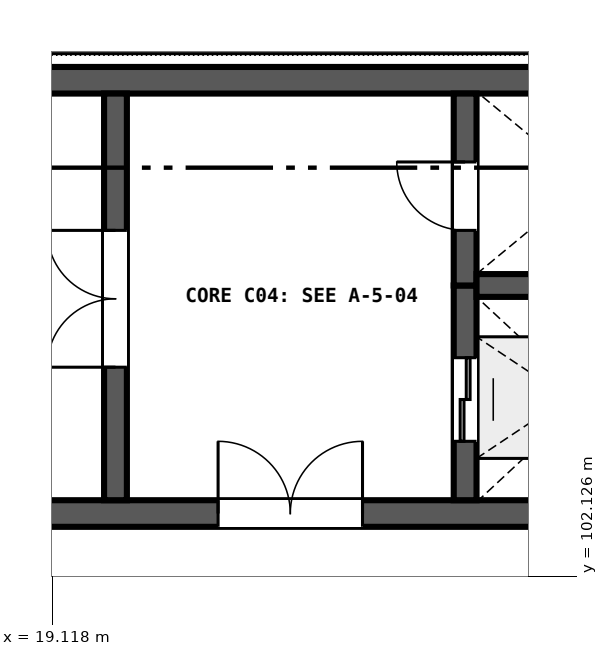
"""IFC4 building model, lengths in metres.
Left out: names, types, materials, properties, quantities, classifications, styles, units other than length and angle.
Written with IfcOpenShell. Run it as: python <this file> out.ifc"""

import sys

from ifc_helpers import new_model, si_unit, direction, frame, frame_2d, origin, place, context, subcontext, project, spatial, rectangle, extrude, element, fill, save


model = new_model("IFC4")
c1 = context("Model", 3, precision=1e-05, world=origin(), true_north=direction((0.0, 1.0)))
c2 = subcontext(c1, "Body", "Model", "MODEL_VIEW")
j1 = project(units=[si_unit("LENGTHUNIT", "METRE"), si_unit("PLANEANGLEUNIT", "RADIAN")], contexts=[c1])
p1 = place(None, origin())
s1 = spatial("IfcSite", under=j1, at=p1, CompositionType="ELEMENT")
p2 = place(p1, origin())
s2 = spatial("IfcBuilding", under=s1, at=p2, CompositionType="ELEMENT")
p3 = place(p2, frame((0.0, 0.0, 4.8)))
s3 = spatial("IfcBuildingStorey", under=s2, at=p3, CompositionType="ELEMENT", Elevation=4.8)
p4 = place(p3, frame((9.9, 102.95, 0.0), z_axis=(0.0, 0.0, 1.0), x_axis=(1.0, 0.0, 0.0)))
e1 = element("IfcWall", 1, at=p4, inside=s3, PredefinedType="SHEAR", context=c2, shape_type="SweptSolid", body=[
    extrude(rectangle(XDim=18.0, YDim=0.35, at=frame_2d((9.0, 0.0))), origin(), (0.0, 0.0, 1.0), 4.52),
])
p5 = place(p4, frame((11.4, 0.0, 0.0)))
e2 = element("IfcOpeningElement", 2, at=p5, cuts=e1, PredefinedType="OPENING", context=c2, shape_type="SweptSolid", body=[
    extrude(rectangle(XDim=1.9, YDim=2.25, at=frame_2d((0.95, 1.125))), frame((0.0, 0.185, 0.0), z_axis=(0.0, -1.0, 0.0), x_axis=(1.0, 0.0, 0.0)), (0.0, 0.0, 1.0), 0.37),
])
p6 = place(p3, frame((27.9, 108.65, 0.0), z_axis=(0.0, 0.0, 1.0), x_axis=(-1.0, 0.0, 0.0)))
e3 = element("IfcWall", 3, at=p6, inside=s3, PredefinedType="SHEAR", context=c2, shape_type="SweptSolid", body=[
    extrude(rectangle(XDim=18.0, YDim=0.35, at=frame_2d((9.0, 0.0))), origin(), (0.0, 0.0, 1.0), 4.52),
])
p7 = place(p3, frame((19.95, 103.125, 0.0), z_axis=(0.0, 0.0, 1.0), x_axis=(0.0, 1.0, 0.0)))
e4 = element("IfcWall", 4, at=p7, inside=s3, PredefinedType="SHEAR", context=c2, shape_type="SweptSolid", body=[
    extrude(rectangle(XDim=5.35, YDim=0.3, at=frame_2d((2.675, 0.0))), origin(), (0.0, 0.0, 1.0), 4.52),
])
p8 = place(p7, frame((1.75, 0.0, 0.0)))
e5 = element("IfcOpeningElement", 5, at=p8, cuts=e4, PredefinedType="OPENING", context=c2, shape_type="SweptSolid", body=[
    extrude(rectangle(XDim=1.8, YDim=2.25, at=frame_2d((0.9, 1.125))), frame((0.0, 0.16, 0.0), z_axis=(0.0, -1.0, 0.0), x_axis=(1.0, 0.0, 0.0)), (0.0, 0.0, 1.0), 0.32),
])
p9 = place(p3, frame((24.55, 103.125, 0.0), z_axis=(0.0, 0.0, 1.0), x_axis=(0.0, 1.0, 0.0)))
e6 = element("IfcWall", 6, at=p9, inside=s3, PredefinedType="SHEAR", context=c2, shape_type="SweptSolid", body=[
    extrude(rectangle(XDim=2.825, YDim=0.3, at=frame_2d((1.413, 0.0))), origin(), (0.0, 0.0, 1.0), 4.52),
])
p10 = place(p9, frame((0.775, 0.0, 0.0)))
e7 = element("IfcOpeningElement", 7, at=p10, cuts=e6, PredefinedType="OPENING", context=c2, shape_type="SweptSolid", body=[
    extrude(rectangle(XDim=1.1, YDim=2.1, at=frame_2d((0.55, 1.05))), frame((0.0, 0.16, 0.0), z_axis=(0.0, -1.0, 0.0), x_axis=(1.0, 0.0, 0.0)), (0.0, 0.0, 1.0), 0.32),
])
p11 = place(p3, frame((24.55, 105.95, 0.0), z_axis=(0.0, 0.0, 1.0), x_axis=(0.0, 1.0, 0.0)))
e8 = element("IfcWall", 8, at=p11, inside=s3, PredefinedType="SHEAR", context=c2, shape_type="SweptSolid", body=[
    extrude(rectangle(XDim=2.525, YDim=0.3, at=frame_2d((1.263, 0.0))), origin(), (0.0, 0.0, 1.0), 4.52),
])
p12 = place(p11, frame((0.725, 0.0, 0.0)))
e9 = element("IfcOpeningElement", 9, at=p12, cuts=e8, PredefinedType="OPENING", context=c2, shape_type="SweptSolid", body=[
    extrude(rectangle(XDim=0.9, YDim=2.1, at=frame_2d((0.45, 1.05))), frame((0.0, 0.16, 0.0), z_axis=(0.0, -1.0, 0.0), x_axis=(1.0, 0.0, 0.0)), (0.0, 0.0, 1.0), 0.32),
])
p13 = place(p3, frame((24.7, 105.95, 0.0), z_axis=(0.0, 0.0, 1.0), x_axis=(1.0, 0.0, 0.0)))
e10 = element("IfcWall", 10, at=p13, inside=s3, PredefinedType="SHEAR", context=c2, shape_type="SweptSolid", body=[
    extrude(rectangle(XDim=2.875, YDim=0.3, at=frame_2d((1.438, 0.0))), origin(), (0.0, 0.0, 1.0), 4.52),
])
p14 = place(p8, origin())
e11 = element("IfcDoor", 11, at=p14, inside=s3, OperationType="DOUBLE_DOOR_SINGLE_SWING", PredefinedType="DOOR", context=c2, shape_type="SweptSolid", body=[
    extrude(rectangle(XDim=1.8, YDim=2.25, at=frame_2d((0.9, 1.125))), frame((0.0, 0.025, 0.0), z_axis=(0.0, -1.0, 0.0), x_axis=(1.0, 0.0, 0.0)), (0.0, 0.0, 1.0), 0.05),
])
fill(e5, e11)
p15 = place(p12, origin())
e12 = element("IfcDoor", 12, at=p15, inside=s3, OperationType="SINGLE_SWING_RIGHT", PredefinedType="DOOR", context=c2, shape_type="SweptSolid", body=[
    extrude(rectangle(XDim=0.9, YDim=2.1, at=frame_2d((0.45, 1.05))), frame((0.0, 0.025, 0.0), z_axis=(0.0, -1.0, 0.0), x_axis=(1.0, 0.0, 0.0)), (0.0, 0.0, 1.0), 0.05),
])
fill(e9, e12)
p16 = place(p10, origin())
e13 = element("IfcDoor", 13, at=p16, inside=s3, OperationType="DOUBLE_DOOR_SLIDING", PredefinedType="DOOR", context=c2, shape_type="SweptSolid", body=[
    extrude(rectangle(XDim=1.1, YDim=2.1, at=frame_2d((0.55, 1.05))), frame((0.0, 0.025, 0.0), z_axis=(0.0, -1.0, 0.0), x_axis=(1.0, 0.0, 0.0)), (0.0, 0.0, 1.0), 0.05),
])
fill(e7, e13)
p17 = place(p5, origin())
e14 = element("IfcDoor", 14, at=p17, inside=s3, OperationType="DOUBLE_DOOR_SINGLE_SWING", PredefinedType="DOOR", context=c2, shape_type="SweptSolid", body=[
    extrude(rectangle(XDim=1.9, YDim=2.25, at=frame_2d((0.95, 1.125))), frame((0.0, 0.025, 0.0), z_axis=(0.0, -1.0, 0.0), x_axis=(1.0, 0.0, 0.0)), (0.0, 0.0, 1.0), 0.05),
])
fill(e2, e14)
save(model, sys.argv[1])
